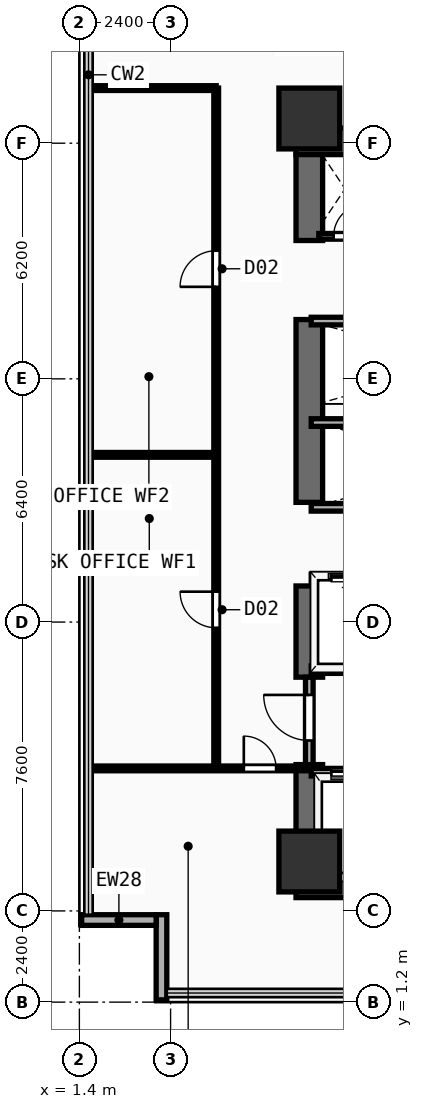
"""IFC4 building model, lengths in metres.
Left out: names, types, materials, properties, quantities, classifications, styles, units other than length and angle.
Written with IfcOpenShell. Run it as: python <this file> out.ifc"""

import sys

from ifc_helpers import new_model, si_unit, direction, frame, frame_2d, origin, origin_2d, place, context, subcontext, project, spatial, rectangle, extrude, element, fill, save


model = new_model("IFC4")
c1 = context("Model", 3, precision=1e-05, world=origin(), true_north=direction((0.0, 1.0)))
c2 = subcontext(c1, "Body", "Model", "MODEL_VIEW")
j1 = project(units=[si_unit("LENGTHUNIT", "METRE"), si_unit("PLANEANGLEUNIT", "RADIAN")], contexts=[c1])
p1 = place(None, origin())
s1 = spatial("IfcSite", under=j1, at=p1, CompositionType="ELEMENT")
p2 = place(p1, origin())
s2 = spatial("IfcBuilding", under=s1, at=p2, CompositionType="ELEMENT")
p3 = place(p2, frame((0.0, 0.0, 33.4)))
s3 = spatial("IfcBuildingStorey", under=s2, at=p3, CompositionType="ELEMENT", Elevation=33.4)
for number, where, z_axis, x_axis in (
    (1, (7.1, 4.3, 0.0), (0.0, 0.0, 1.0), (1.0, 0.0, 0.0)),
    (2, (7.1, 23.85, 0.0), (0.0, 0.0, 1.0), (1.0, 0.0, 0.0)),
):
    element("IfcWall", number, at=place(p3, frame(where, z_axis=z_axis, x_axis=x_axis)), inside=s3, PredefinedType="SHEAR", context=c2, shape_type="SweptSolid", body=[
        extrude(rectangle(XDim=14.05, YDim=0.7, at=frame_2d((7.025, 0.0))), origin(), (0.0, 0.0, 1.0), 3.54),
    ])
p4 = place(p3, frame((7.45, 4.65, 0.0), z_axis=(0.0, 0.0, 1.0), x_axis=(0.0, 1.0, 0.0)))
e3 = element("IfcWall", 3, at=p4, inside=s3, PredefinedType="SHEAR", context=c2, shape_type="SweptSolid", body=[
    extrude(rectangle(XDim=2.8, YDim=0.7, at=frame_2d((1.4, 0.0))), origin(), (0.0, 0.0, 1.0), 3.54),
])
p5 = place(p3, frame((7.45, 9.75, 0.0), z_axis=(0.0, 0.0, 1.0), x_axis=(0.0, 1.0, 0.0)))
e4 = element("IfcWall", 4, at=p5, inside=s3, PredefinedType="SHEAR", context=c2, shape_type="SweptSolid", body=[
    extrude(rectangle(XDim=2.4, YDim=0.7, at=frame_2d((1.2, 0.0))), origin(), (0.0, 0.0, 1.0), 3.54),
])
p6 = place(p3, frame((7.45, 14.35, 0.0), z_axis=(0.0, 0.0, 1.0), x_axis=(0.0, 1.0, 0.0)))
e5 = element("IfcWall", 5, at=p6, inside=s3, PredefinedType="SHEAR", context=c2, shape_type="SweptSolid", body=[
    extrude(rectangle(XDim=4.81, YDim=0.7, at=frame_2d((2.405, 0.0))), origin(), (0.0, 0.0, 1.0), 3.54),
])
p7 = place(p3, frame((7.45, 21.24, 0.0), z_axis=(0.0, 0.0, 1.0), x_axis=(0.0, 1.0, 0.0)))
e6 = element("IfcWall", 6, at=p7, inside=s3, PredefinedType="SHEAR", context=c2, shape_type="SweptSolid", body=[
    extrude(rectangle(XDim=2.26, YDim=0.7, at=frame_2d((1.13, 0.0))), origin(), (0.0, 0.0, 1.0), 3.54),
])
for number, where, z_axis, x_axis in (
    (7, (7.45, 4.9, 0.0), (0.0, 0.0, 1.0), (1.0, 0.0, 0.0)),
    (8, (7.45, 24.45, 0.0), (0.0, 0.0, 1.0), (1.0, 0.0, 0.0)),
):
    element("IfcColumn", number, at=place(p3, frame(where, z_axis=z_axis, x_axis=x_axis)), inside=s3, PredefinedType="COLUMN", context=c2, shape_type="SweptSolid", body=[
        extrude(rectangle(XDim=1.6, YDim=1.6, at=origin_2d()), origin(), (0.0, 0.0, 1.0), 3.54),
    ])
p8 = place(p3, frame((3.56, 1.26, 0.0), z_axis=(0.0, 0.0, 1.0), x_axis=(0.0, 1.0, 0.0)))
e9 = element("IfcWall", 9, at=p8, inside=s3, PredefinedType="SOLIDWALL", context=c2, shape_type="SweptSolid", body=[
    extrude(rectangle(XDim=2.24, YDim=0.28, at=frame_2d((1.12, 0.0))), origin(), (0.0, 0.0, 1.0), 3.54),
])
p9 = place(p3, frame((1.46, 3.36, 0.0), z_axis=(0.0, 0.0, 1.0), x_axis=(1.0, 0.0, 0.0)))
e10 = element("IfcWall", 10, at=p9, inside=s3, PredefinedType="SOLIDWALL", context=c2, shape_type="SweptSolid", body=[
    extrude(rectangle(XDim=1.96, YDim=0.28, at=frame_2d((0.98, 0.0))), origin(), (0.0, 0.0, 1.0), 3.54),
])
p10 = place(p3, frame((7.5, 7.25, 0.0), z_axis=(0.0, 0.0, 1.0), x_axis=(1.0, 0.0, 0.0)))
e11 = element("IfcWall", 11, at=p10, inside=s3, PredefinedType="PARTITIONING", context=c2, shape_type="SweptSolid", body=[
    extrude(rectangle(XDim=8.35, YDim=0.2, at=frame_2d((4.175, 0.0))), origin(), (0.0, 0.0, 1.0), 3.54),
])
p11 = place(p10, frame((0.53, 0.0, 0.0)))
e12 = element("IfcOpeningElement", 12, at=p11, cuts=e11, PredefinedType="OPENING", context=c2, shape_type="SweptSolid", body=[
    extrude(rectangle(XDim=1.1, YDim=2.2, at=frame_2d((0.55, 1.1))), frame((0.0, 0.11, 0.0), z_axis=(0.0, -1.0, 0.0), x_axis=(1.0, 0.0, 0.0)), (0.0, 0.0, 1.0), 0.22),
])
p12 = place(p10, frame((2.37, 0.0, 0.0)))
e13 = element("IfcOpeningElement", 13, at=p12, cuts=e11, PredefinedType="OPENING", context=c2, shape_type="SweptSolid", body=[
    extrude(rectangle(XDim=1.1, YDim=2.2, at=frame_2d((0.55, 1.1))), frame((0.0, 0.11, 0.0), z_axis=(0.0, -1.0, 0.0), x_axis=(1.0, 0.0, 0.0)), (0.0, 0.0, 1.0), 0.22),
])
p13 = place(p10, frame((4.33, 0.0, 0.0)))
e14 = element("IfcOpeningElement", 14, at=p13, cuts=e11, PredefinedType="OPENING", context=c2, shape_type="SweptSolid", body=[
    extrude(rectangle(XDim=1.1, YDim=2.2, at=frame_2d((0.55, 1.1))), frame((0.0, 0.11, 0.0), z_axis=(0.0, -1.0, 0.0), x_axis=(1.0, 0.0, 0.0)), (0.0, 0.0, 1.0), 0.22),
])
p14 = place(p10, frame((6.5, 0.0, 0.0)))
e15 = element("IfcOpeningElement", 15, at=p14, cuts=e11, PredefinedType="OPENING", context=c2, shape_type="SweptSolid", body=[
    extrude(rectangle(XDim=1.1, YDim=2.2, at=frame_2d((0.55, 1.1))), frame((0.0, 0.11, 0.0), z_axis=(0.0, -1.0, 0.0), x_axis=(1.0, 0.0, 0.0)), (0.0, 0.0, 1.0), 0.22),
])
p15 = place(p3, frame((7.5, 9.95, 0.0), z_axis=(0.0, 0.0, 1.0), x_axis=(1.0, 0.0, 0.0)))
e16 = element("IfcWall", 16, at=p15, inside=s3, PredefinedType="PARTITIONING", context=c2, shape_type="SweptSolid", body=[
    extrude(rectangle(XDim=8.35, YDim=0.2, at=frame_2d((4.175, 0.0))), origin(), (0.0, 0.0, 1.0), 3.54),
])
p16 = place(p3, frame((7.45, 7.45, 0.0), z_axis=(0.0, 0.0, 1.0), x_axis=(0.0, 1.0, 0.0)))
e17 = element("IfcWall", 17, at=p16, inside=s3, PredefinedType="PARTITIONING", context=c2, shape_type="SweptSolid", body=[
    extrude(rectangle(XDim=2.3, YDim=0.2, at=frame_2d((1.15, 0.0))), origin(), (0.0, 0.0, 1.0), 2.52),
])
p17 = place(p16, frame((0.633, 0.0, 0.0)))
e18 = element("IfcOpeningElement", 18, at=p17, cuts=e17, PredefinedType="OPENING", context=c2, shape_type="SweptSolid", body=[
    extrude(rectangle(XDim=1.2, YDim=2.25, at=frame_2d((0.6, 1.125))), frame((0.0, 0.11, 0.0), z_axis=(0.0, -1.0, 0.0), x_axis=(1.0, 0.0, 0.0)), (0.0, 0.0, 1.0), 0.22),
])
p18 = place(p3, frame((7.5, 12.36, 0.0), z_axis=(0.0, 0.0, 1.0), x_axis=(1.0, 0.0, 0.0)))
e19 = element("IfcWall", 19, at=p18, inside=s3, PredefinedType="PARTITIONING", context=c2, shape_type="SweptSolid", body=[
    extrude(rectangle(XDim=7.85, YDim=0.2, at=frame_2d((3.925, 0.0))), origin(), (0.0, 0.0, 1.0), 3.54),
])
p19 = place(p18, frame((0.53, 0.0, 0.0)))
e20 = element("IfcOpeningElement", 20, at=p19, cuts=e19, PredefinedType="OPENING", context=c2, shape_type="SweptSolid", body=[
    extrude(rectangle(XDim=1.1, YDim=2.2, at=frame_2d((0.55, 1.1))), frame((0.0, 0.11, 0.0), z_axis=(0.0, -1.0, 0.0), x_axis=(1.0, 0.0, 0.0)), (0.0, 0.0, 1.0), 0.22),
])
p20 = place(p18, frame((2.42, 0.0, 0.0)))
e21 = element("IfcOpeningElement", 21, at=p20, cuts=e19, PredefinedType="OPENING", context=c2, shape_type="SweptSolid", body=[
    extrude(rectangle(XDim=1.1, YDim=2.2, at=frame_2d((0.55, 1.1))), frame((0.0, 0.11, 0.0), z_axis=(0.0, -1.0, 0.0), x_axis=(1.0, 0.0, 0.0)), (0.0, 0.0, 1.0), 0.22),
])
p21 = place(p18, frame((4.31, 0.0, 0.0)))
e22 = element("IfcOpeningElement", 22, at=p21, cuts=e19, PredefinedType="OPENING", context=c2, shape_type="SweptSolid", body=[
    extrude(rectangle(XDim=1.1, YDim=2.2, at=frame_2d((0.55, 1.1))), frame((0.0, 0.11, 0.0), z_axis=(0.0, -1.0, 0.0), x_axis=(1.0, 0.0, 0.0)), (0.0, 0.0, 1.0), 0.22),
])
p22 = place(p18, frame((6.2, 0.0, 0.0)))
e23 = element("IfcOpeningElement", 23, at=p22, cuts=e19, PredefinedType="OPENING", context=c2, shape_type="SweptSolid", body=[
    extrude(rectangle(XDim=1.1, YDim=2.2, at=frame_2d((0.55, 1.1))), frame((0.0, 0.11, 0.0), z_axis=(0.0, -1.0, 0.0), x_axis=(1.0, 0.0, 0.0)), (0.0, 0.0, 1.0), 0.22),
])
for number, where, z_axis, x_axis in (
    (24, (7.5, 14.22, 0.0), (0.0, 0.0, 1.0), (1.0, 0.0, 0.0)),
    (25, (7.5, 16.45, 0.0), (0.0, 0.0, 1.0), (1.0, 0.0, 0.0)),
    (26, (7.5, 19.12, 0.0), (0.0, 0.0, 1.0), (1.0, 0.0, 0.0)),
):
    element("IfcWall", number, at=place(p3, frame(where, z_axis=z_axis, x_axis=x_axis)), inside=s3, PredefinedType="PARTITIONING", context=c2, shape_type="SweptSolid", body=[
        extrude(rectangle(XDim=7.85, YDim=0.2, at=frame_2d((3.925, 0.0))), origin(), (0.0, 0.0, 1.0), 3.54),
    ])
p23 = place(p3, frame((7.7, 21.35, 0.0), z_axis=(0.0, 0.0, 1.0), x_axis=(1.0, 0.0, 0.0)))
e27 = element("IfcWall", 27, at=p23, inside=s3, PredefinedType="PARTITIONING", context=c2, shape_type="SweptSolid", body=[
    extrude(rectangle(XDim=1.55, YDim=0.15, at=frame_2d((0.775, 0.0))), origin(), (0.0, 0.0, 1.0), 3.54),
])
p24 = place(p23, frame((0.39, 0.0, 0.0)))
e28 = element("IfcOpeningElement", 28, at=p24, cuts=e27, PredefinedType="OPENING", context=c2, shape_type="SweptSolid", body=[
    extrude(rectangle(XDim=0.85, YDim=2.15, at=frame_2d((0.425, 1.075))), frame((0.0, 0.085, 0.0), z_axis=(0.0, -1.0, 0.0), x_axis=(1.0, 0.0, 0.0)), (0.0, 0.0, 1.0), 0.17),
])
p25 = place(p3, frame((1.64, 7.35, 0.0), z_axis=(0.0, 0.0, 1.0), x_axis=(1.0, 0.0, 0.0)))
e29 = element("IfcWall", 29, at=p25, inside=s3, PredefinedType="PARTITIONING", context=c2, shape_type="SweptSolid", body=[
    extrude(rectangle(XDim=5.76, YDim=0.125, at=frame_2d((2.88, 0.0))), origin(), (0.0, 0.0, 1.0), 3.54),
])
p26 = place(p25, frame((4.087, 0.0, 0.0)))
e30 = element("IfcOpeningElement", 30, at=p26, cuts=e29, PredefinedType="OPENING", context=c2, shape_type="SweptSolid", body=[
    extrude(rectangle(XDim=0.85, YDim=2.15, at=frame_2d((0.425, 1.075))), frame((0.0, 0.073, 0.0), z_axis=(0.0, -1.0, 0.0), x_axis=(1.0, 0.0, 0.0)), (0.0, 0.0, 1.0), 0.145),
])
p27 = place(p3, frame((5.0, 7.5, 0.0), z_axis=(0.0, 0.0, 1.0), x_axis=(0.0, 1.0, 0.0)))
e31 = element("IfcWall", 31, at=p27, inside=s3, PredefinedType="PARTITIONING", context=c2, shape_type="SweptSolid", body=[
    extrude(rectangle(XDim=17.75, YDim=0.125, at=frame_2d((8.875, 0.0))), origin(), (0.0, 0.0, 1.0), 3.54),
])
p28 = place(p27, frame((3.55, 0.0, 0.0)))
e32 = element("IfcOpeningElement", 32, at=p28, cuts=e31, PredefinedType="OPENING", context=c2, shape_type="SweptSolid", body=[
    extrude(rectangle(XDim=0.95, YDim=2.15, at=frame_2d((0.475, 1.075))), frame((0.0, 0.073, 0.0), z_axis=(0.0, -1.0, 0.0), x_axis=(1.0, 0.0, 0.0)), (0.0, 0.0, 1.0), 0.145),
])
p29 = place(p27, frame((12.521, 0.0, 0.0)))
e33 = element("IfcOpeningElement", 33, at=p29, cuts=e31, PredefinedType="OPENING", context=c2, shape_type="SweptSolid", body=[
    extrude(rectangle(XDim=0.95, YDim=2.15, at=frame_2d((0.475, 1.075))), frame((0.0, 0.073, 0.0), z_axis=(0.0, -1.0, 0.0), x_axis=(1.0, 0.0, 0.0)), (0.0, 0.0, 1.0), 0.145),
])
for number, where, z_axis, x_axis in (
    (34, (1.64, 25.25, 0.0), (0.0, 0.0, 1.0), (1.0, 0.0, 0.0)),
    (35, (1.64, 15.6, 0.0), (0.0, 0.0, 1.0), (1.0, 0.0, 0.0)),
):
    element("IfcWall", number, at=place(p3, frame(where, z_axis=z_axis, x_axis=x_axis)), inside=s3, PredefinedType="PARTITIONING", context=c2, shape_type="SweptSolid", body=[
        extrude(rectangle(XDim=3.36, YDim=0.125, at=frame_2d((1.68, 0.0))), origin(), (0.0, 0.0, 1.0), 3.54),
    ])
p30 = place(p11, origin())
e36 = element("IfcDoor", 36, at=p30, inside=s3, OperationType="SLIDING_TO_LEFT", PredefinedType="DOOR", context=c2, shape_type="SweptSolid", body=[
    extrude(rectangle(XDim=1.1, YDim=2.2, at=frame_2d((0.55, 1.1))), frame((0.0, 0.025, 0.0), z_axis=(0.0, -1.0, 0.0), x_axis=(1.0, 0.0, 0.0)), (0.0, 0.0, 1.0), 0.05),
])
fill(e12, e36)
p31 = place(p17, frame((1.2, 0.0, 0.0), z_axis=(0.0, 0.0, 1.0), x_axis=(-1.0, 0.0, 0.0)))
e37 = element("IfcDoor", 37, at=p31, inside=s3, OperationType="SINGLE_SWING_LEFT", PredefinedType="DOOR", context=c2, shape_type="SweptSolid", body=[
    extrude(rectangle(XDim=1.2, YDim=2.25, at=frame_2d((0.6, 1.125))), frame((0.0, 0.025, 0.0), z_axis=(0.0, -1.0, 0.0), x_axis=(1.0, 0.0, 0.0)), (0.0, 0.0, 1.0), 0.05),
])
fill(e18, e37)
p32 = place(p19, origin())
e38 = element("IfcDoor", 38, at=p32, inside=s3, OperationType="SLIDING_TO_LEFT", PredefinedType="DOOR", context=c2, shape_type="SweptSolid", body=[
    extrude(rectangle(XDim=1.1, YDim=2.2, at=frame_2d((0.55, 1.1))), frame((0.0, 0.025, 0.0), z_axis=(0.0, -1.0, 0.0), x_axis=(1.0, 0.0, 0.0)), (0.0, 0.0, 1.0), 0.05),
])
fill(e20, e38)
p33 = place(p24, origin())
e39 = element("IfcDoor", 39, at=p33, inside=s3, OperationType="SINGLE_SWING_RIGHT", PredefinedType="DOOR", context=c2, shape_type="SweptSolid", body=[
    extrude(rectangle(XDim=0.85, YDim=2.15, at=frame_2d((0.425, 1.075))), frame((0.0, 0.025, 0.0), z_axis=(0.0, -1.0, 0.0), x_axis=(1.0, 0.0, 0.0)), (0.0, 0.0, 1.0), 0.05),
])
fill(e28, e39)
p34 = place(p26, origin())
e40 = element("IfcDoor", 40, at=p34, inside=s3, OperationType="SINGLE_SWING_LEFT", PredefinedType="DOOR", context=c2, shape_type="SweptSolid", body=[
    extrude(rectangle(XDim=0.85, YDim=2.15, at=frame_2d((0.425, 1.075))), frame((0.0, 0.025, 0.0), z_axis=(0.0, -1.0, 0.0), x_axis=(1.0, 0.0, 0.0)), (0.0, 0.0, 1.0), 0.05),
])
fill(e30, e40)
p35 = place(p28, origin())
e41 = element("IfcDoor", 41, at=p35, inside=s3, OperationType="SINGLE_SWING_RIGHT", PredefinedType="DOOR", context=c2, shape_type="SweptSolid", body=[
    extrude(rectangle(XDim=0.95, YDim=2.15, at=frame_2d((0.475, 1.075))), frame((0.0, 0.025, 0.0), z_axis=(0.0, -1.0, 0.0), x_axis=(1.0, 0.0, 0.0)), (0.0, 0.0, 1.0), 0.05),
])
fill(e32, e41)
p36 = place(p29, origin())
e42 = element("IfcDoor", 42, at=p36, inside=s3, OperationType="SINGLE_SWING_LEFT", PredefinedType="DOOR", context=c2, shape_type="SweptSolid", body=[
    extrude(rectangle(XDim=0.95, YDim=2.15, at=frame_2d((0.475, 1.075))), frame((0.0, 0.025, 0.0), z_axis=(0.0, -1.0, 0.0), x_axis=(1.0, 0.0, 0.0)), (0.0, 0.0, 1.0), 0.05),
])
fill(e33, e42)
save(model, sys.argv[1])
